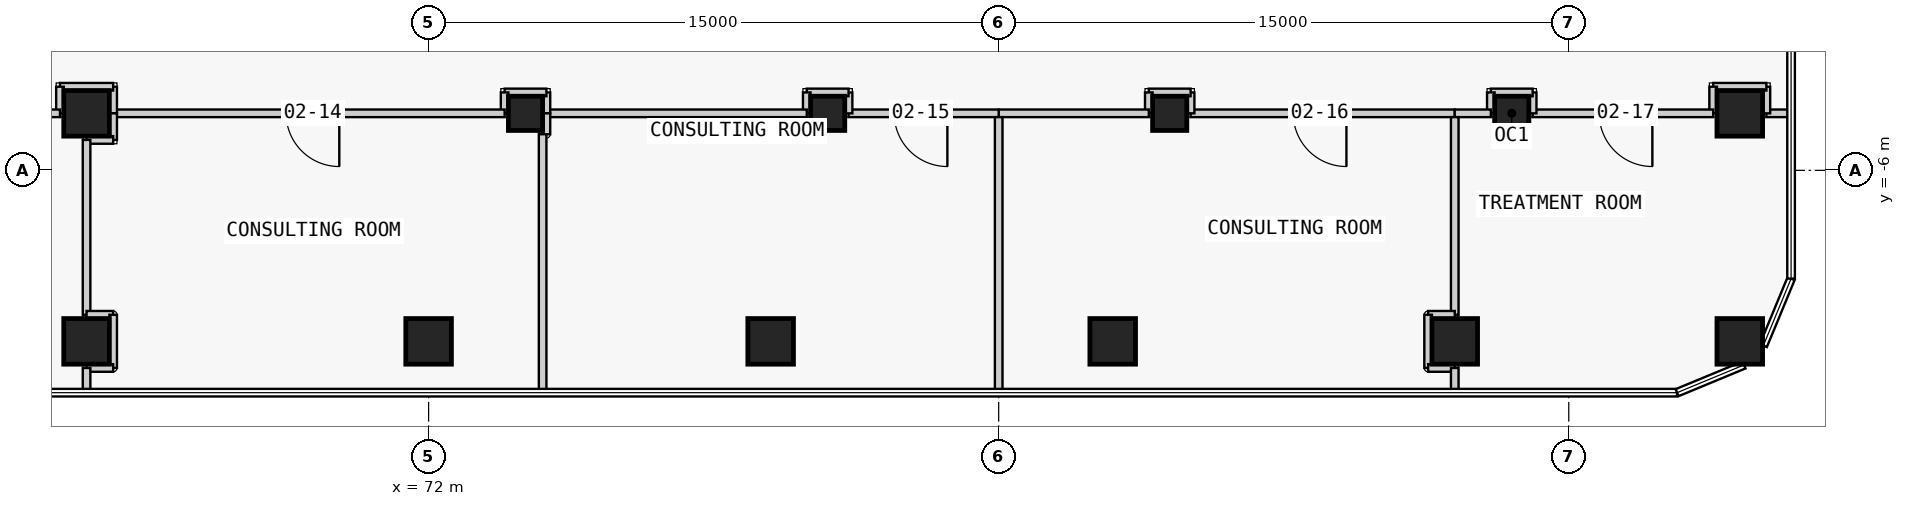
"""IFC4 building model, lengths in metres.
Left out: names, types, materials, properties, quantities, classifications, styles, units other than length and angle.
Written with IfcOpenShell. Run it as: python <this file> out.ifc"""

import sys

from ifc_helpers import new_model, si_unit, direction, frame, frame_2d, origin, origin_2d, place, context, subcontext, project, spatial, rectangle, extrude, element, fill, save


model = new_model("IFC4")
c1 = context("Model", 3, precision=1e-05, world=origin(), true_north=direction((0.0, 1.0)))
c2 = subcontext(c1, "Body", "Model", "MODEL_VIEW")
j1 = project(units=[si_unit("LENGTHUNIT", "METRE"), si_unit("PLANEANGLEUNIT", "RADIAN")], contexts=[c1])
p1 = place(None, origin())
s1 = spatial("IfcSite", under=j1, at=p1, CompositionType="ELEMENT")
p2 = place(p1, origin())
s2 = spatial("IfcBuilding", under=s1, at=p2, CompositionType="ELEMENT")
p3 = place(p2, frame((0.0, 0.0, 12.8)))
s3 = spatial("IfcBuildingStorey", under=s2, at=p3, CompositionType="ELEMENT", Elevation=12.8)
for number, where, z_axis, x_axis in (
    (1, (63.0, -10.5, 0.0), (0.0, 0.0, 1.0), (1.0, 0.0, 0.0)),
    (2, (63.0, -4.5, 0.0), (0.0, 0.0, 1.0), (1.0, 0.0, 0.0)),
    (3, (72.0, -10.5, 0.0), (0.0, 0.0, 1.0), (1.0, 0.0, 0.0)),
    (4, (81.0, -10.5, 0.0), (0.0, 0.0, 1.0), (1.0, 0.0, 0.0)),
    (5, (90.0, -10.5, 0.0), (0.0, 0.0, 1.0), (1.0, 0.0, 0.0)),
    (6, (99.0, -10.5, 0.0), (0.0, 0.0, 1.0), (1.0, 0.0, 0.0)),
    (7, (106.5, -10.5, 0.0), (0.0, 0.0, 1.0), (1.0, 0.0, 0.0)),
    (8, (106.5, -4.5, 0.0), (0.0, 0.0, 1.0), (1.0, 0.0, 0.0)),
):
    element("IfcColumn", number, at=place(p3, frame(where, z_axis=z_axis, x_axis=x_axis)), inside=s3, PredefinedType="COLUMN", context=c2, shape_type="SweptSolid", body=[
        extrude(rectangle(XDim=1.2, YDim=1.2, at=origin_2d()), origin(), (0.0, 0.0, 1.0), 4.5),
    ])
for number, where, z_axis, x_axis in (
    (9, (74.55, -4.5, 0.0), (0.0, 0.0, 1.0), (1.0, 0.0, 0.0)),
    (10, (82.5, -4.5, 0.0), (0.0, 0.0, 1.0), (1.0, 0.0, 0.0)),
    (11, (91.5, -4.5, 0.0), (0.0, 0.0, 1.0), (1.0, 0.0, 0.0)),
    (12, (100.5, -4.5, 0.0), (0.0, 0.0, 1.0), (1.0, 0.0, 0.0)),
):
    element("IfcColumn", number, at=place(p3, frame(where, z_axis=z_axis, x_axis=x_axis)), inside=s3, PredefinedType="COLUMN", context=c2, shape_type="SweptSolid", body=[
        extrude(rectangle(XDim=0.9, YDim=0.9, at=origin_2d()), origin(), (0.0, 0.0, 1.0), 4.5),
    ])
p4 = place(p3, frame((99.0, -4.5, 0.0), z_axis=(0.0, 0.0, 1.0), x_axis=(-1.0, 0.0, 0.0)))
e13 = element("IfcWall", 13, at=p4, inside=s3, PredefinedType="PARTITIONING", context=c2, shape_type="SweptSolid", body=[
    extrude(rectangle(XDim=6.95, YDim=0.2, at=frame_2d((3.475, 0.0))), origin(), (0.0, 0.0, 1.0), 4.15),
])
p5 = place(p4, frame((2.85, 0.0, 0.0)))
e14 = element("IfcOpeningElement", 14, at=p5, cuts=e13, PredefinedType="OPENING", context=c2, shape_type="SweptSolid", body=[
    extrude(rectangle(XDim=1.4, YDim=2.1, at=frame_2d((0.7, 1.05))), frame((0.0, 0.11, 0.0), z_axis=(0.0, -1.0, 0.0), x_axis=(1.0, 0.0, 0.0)), (0.0, 0.0, 1.0), 0.22),
])
p6 = place(p3, frame((92.05, -4.5, 0.0), z_axis=(0.0, 0.0, 1.0), x_axis=(0.0, 1.0, 0.0)))
e15 = element("IfcWall", 15, at=p6, inside=s3, PredefinedType="PARTITIONING", context=c2, shape_type="SweptSolid", body=[
    extrude(rectangle(XDim=0.55, YDim=0.2, at=frame_2d((0.275, 0.0))), origin(), (0.0, 0.0, 1.0), 4.15),
])
p7 = place(p3, frame((92.05, -3.95, 0.0), z_axis=(0.0, 0.0, 1.0), x_axis=(-1.0, 0.0, 0.0)))
e16 = element("IfcWall", 16, at=p7, inside=s3, PredefinedType="PARTITIONING", context=c2, shape_type="SweptSolid", body=[
    extrude(rectangle(XDim=1.1, YDim=0.2, at=frame_2d((0.55, 0.0))), origin(), (0.0, 0.0, 1.0), 4.15),
])
p8 = place(p3, frame((90.95, -3.95, 0.0), z_axis=(0.0, 0.0, 1.0), x_axis=(0.0, -1.0, 0.0)))
e17 = element("IfcWall", 17, at=p8, inside=s3, PredefinedType="PARTITIONING", context=c2, shape_type="SweptSolid", body=[
    extrude(rectangle(XDim=0.55, YDim=0.2, at=frame_2d((0.275, 0.0))), origin(), (0.0, 0.0, 1.0), 4.15),
])
p9 = place(p3, frame((90.95, -4.5, 0.0), z_axis=(0.0, 0.0, 1.0), x_axis=(-1.0, 0.0, 0.0)))
e18 = element("IfcWall", 18, at=p9, inside=s3, PredefinedType="PARTITIONING", context=c2, shape_type="SweptSolid", body=[
    extrude(rectangle(XDim=3.95, YDim=0.2, at=frame_2d((1.975, 0.0))), origin(), (0.0, 0.0, 1.0), 4.15),
])
p10 = place(p3, frame((87.0, -4.5, 0.0), z_axis=(0.0, 0.0, 1.0), x_axis=(-1.0, 0.0, 0.0)))
e19 = element("IfcWall", 19, at=p10, inside=s3, PredefinedType="PARTITIONING", context=c2, shape_type="SweptSolid", body=[
    extrude(rectangle(XDim=3.95, YDim=0.2, at=frame_2d((1.975, 0.0))), origin(), (0.0, 0.0, 1.0), 4.15),
])
p11 = place(p10, frame((1.35, 0.0, 0.0)))
e20 = element("IfcOpeningElement", 20, at=p11, cuts=e19, PredefinedType="OPENING", context=c2, shape_type="SweptSolid", body=[
    extrude(rectangle(XDim=1.4, YDim=2.1, at=frame_2d((0.7, 1.05))), frame((0.0, 0.11, 0.0), z_axis=(0.0, -1.0, 0.0), x_axis=(1.0, 0.0, 0.0)), (0.0, 0.0, 1.0), 0.22),
])
p12 = place(p3, frame((83.05, -4.5, 0.0), z_axis=(0.0, 0.0, 1.0), x_axis=(0.0, 1.0, 0.0)))
e21 = element("IfcWall", 21, at=p12, inside=s3, PredefinedType="PARTITIONING", context=c2, shape_type="SweptSolid", body=[
    extrude(rectangle(XDim=0.55, YDim=0.2, at=frame_2d((0.275, 0.0))), origin(), (0.0, 0.0, 1.0), 4.15),
])
p13 = place(p3, frame((83.05, -3.95, 0.0), z_axis=(0.0, 0.0, 1.0), x_axis=(-1.0, 0.0, 0.0)))
e22 = element("IfcWall", 22, at=p13, inside=s3, PredefinedType="PARTITIONING", context=c2, shape_type="SweptSolid", body=[
    extrude(rectangle(XDim=1.1, YDim=0.2, at=frame_2d((0.55, 0.0))), origin(), (0.0, 0.0, 1.0), 4.15),
])
p14 = place(p3, frame((81.95, -3.95, 0.0), z_axis=(0.0, 0.0, 1.0), x_axis=(0.0, -1.0, 0.0)))
e23 = element("IfcWall", 23, at=p14, inside=s3, PredefinedType="PARTITIONING", context=c2, shape_type="SweptSolid", body=[
    extrude(rectangle(XDim=0.55, YDim=0.2, at=frame_2d((0.275, 0.0))), origin(), (0.0, 0.0, 1.0), 4.15),
])
p15 = place(p3, frame((81.95, -4.5, 0.0), z_axis=(0.0, 0.0, 1.0), x_axis=(-1.0, 0.0, 0.0)))
e24 = element("IfcWall", 24, at=p15, inside=s3, PredefinedType="PARTITIONING", context=c2, shape_type="SweptSolid", body=[
    extrude(rectangle(XDim=6.85, YDim=0.2, at=frame_2d((3.425, 0.0))), origin(), (0.0, 0.0, 1.0), 4.15),
])
p16 = place(p3, frame((75.1, -4.5, 0.0), z_axis=(0.0, 0.0, 1.0), x_axis=(0.0, 1.0, 0.0)))
e25 = element("IfcWall", 25, at=p16, inside=s3, PredefinedType="PARTITIONING", context=c2, shape_type="SweptSolid", body=[
    extrude(rectangle(XDim=0.55, YDim=0.2, at=frame_2d((0.275, 0.0))), origin(), (0.0, 0.0, 1.0), 4.15),
])
p17 = place(p3, frame((75.1, -3.95, 0.0), z_axis=(0.0, 0.0, 1.0), x_axis=(-1.0, 0.0, 0.0)))
e26 = element("IfcWall", 26, at=p17, inside=s3, PredefinedType="PARTITIONING", context=c2, shape_type="SweptSolid", body=[
    extrude(rectangle(XDim=1.1, YDim=0.2, at=frame_2d((0.55, 0.0))), origin(), (0.0, 0.0, 1.0), 4.15),
])
p18 = place(p3, frame((74.0, -3.95, 0.0), z_axis=(0.0, 0.0, 1.0), x_axis=(0.0, -1.0, 0.0)))
e27 = element("IfcWall", 27, at=p18, inside=s3, PredefinedType="PARTITIONING", context=c2, shape_type="SweptSolid", body=[
    extrude(rectangle(XDim=0.55, YDim=0.2, at=frame_2d((0.275, 0.0))), origin(), (0.0, 0.0, 1.0), 4.15),
])
p19 = place(p3, frame((74.0, -4.5, 0.0), z_axis=(0.0, 0.0, 1.0), x_axis=(-1.0, 0.0, 0.0)))
e28 = element("IfcWall", 28, at=p19, inside=s3, PredefinedType="PARTITIONING", context=c2, shape_type="SweptSolid", body=[
    extrude(rectangle(XDim=10.3, YDim=0.2, at=frame_2d((5.15, 0.0))), origin(), (0.0, 0.0, 1.0), 4.15),
])
p20 = place(p19, frame((4.35, 0.0, 0.0)))
e29 = element("IfcOpeningElement", 29, at=p20, cuts=e28, PredefinedType="OPENING", context=c2, shape_type="SweptSolid", body=[
    extrude(rectangle(XDim=1.4, YDim=2.1, at=frame_2d((0.7, 1.05))), frame((0.0, 0.11, 0.0), z_axis=(0.0, -1.0, 0.0), x_axis=(1.0, 0.0, 0.0)), (0.0, 0.0, 1.0), 0.22),
])
p21 = place(p3, frame((107.85, -4.5, 0.0), z_axis=(0.0, 0.0, 1.0), x_axis=(-1.0, 0.0, 0.0)))
e30 = element("IfcWall", 30, at=p21, inside=s3, PredefinedType="PARTITIONING", context=c2, shape_type="SweptSolid", body=[
    extrude(rectangle(XDim=0.65, YDim=0.2, at=frame_2d((0.325, 0.0))), origin(), (0.0, 0.0, 1.0), 4.15),
])
p22 = place(p3, frame((107.2, -4.5, 0.0), z_axis=(0.0, 0.0, 1.0), x_axis=(0.0, 1.0, 0.0)))
e31 = element("IfcWall", 31, at=p22, inside=s3, PredefinedType="PARTITIONING", context=c2, shape_type="SweptSolid", body=[
    extrude(rectangle(XDim=0.7, YDim=0.2, at=frame_2d((0.35, 0.0))), origin(), (0.0, 0.0, 1.0), 4.15),
])
p23 = place(p3, frame((107.2, -3.8, 0.0), z_axis=(0.0, 0.0, 1.0), x_axis=(-1.0, 0.0, 0.0)))
e32 = element("IfcWall", 32, at=p23, inside=s3, PredefinedType="PARTITIONING", context=c2, shape_type="SweptSolid", body=[
    extrude(rectangle(XDim=1.4, YDim=0.2, at=frame_2d((0.7, 0.0))), origin(), (0.0, 0.0, 1.0), 3.45),
])
p24 = place(p3, frame((105.8, -3.8, 0.0), z_axis=(0.0, 0.0, 1.0), x_axis=(0.0, -1.0, 0.0)))
e33 = element("IfcWall", 33, at=p24, inside=s3, PredefinedType="PARTITIONING", context=c2, shape_type="SweptSolid", body=[
    extrude(rectangle(XDim=0.7, YDim=0.2, at=frame_2d((0.35, 0.0))), origin(), (0.0, 0.0, 1.0), 4.15),
])
p25 = place(p3, frame((105.8, -4.5, 0.0), z_axis=(0.0, 0.0, 1.0), x_axis=(-1.0, 0.0, 0.0)))
e34 = element("IfcWall", 34, at=p25, inside=s3, PredefinedType="PARTITIONING", context=c2, shape_type="SweptSolid", body=[
    extrude(rectangle(XDim=4.75, YDim=0.2, at=frame_2d((2.375, 0.0))), origin(), (0.0, 0.0, 1.0), 4.15),
])
p26 = place(p25, frame((1.6, 0.0, 0.0)))
e35 = element("IfcOpeningElement", 35, at=p26, cuts=e34, PredefinedType="OPENING", context=c2, shape_type="SweptSolid", body=[
    extrude(rectangle(XDim=1.4, YDim=2.1, at=frame_2d((0.7, 1.05))), frame((0.0, 0.11, 0.0), z_axis=(0.0, -1.0, 0.0), x_axis=(1.0, 0.0, 0.0)), (0.0, 0.0, 1.0), 0.22),
])
p27 = place(p3, frame((101.05, -4.5, 0.0), z_axis=(0.0, 0.0, 1.0), x_axis=(0.0, 1.0, 0.0)))
e36 = element("IfcWall", 36, at=p27, inside=s3, PredefinedType="PARTITIONING", context=c2, shape_type="SweptSolid", body=[
    extrude(rectangle(XDim=0.55, YDim=0.2, at=frame_2d((0.275, 0.0))), origin(), (0.0, 0.0, 1.0), 4.15),
])
p28 = place(p3, frame((101.05, -3.95, 0.0), z_axis=(0.0, 0.0, 1.0), x_axis=(-1.0, 0.0, 0.0)))
e37 = element("IfcWall", 37, at=p28, inside=s3, PredefinedType="PARTITIONING", context=c2, shape_type="SweptSolid", body=[
    extrude(rectangle(XDim=1.1, YDim=0.2, at=frame_2d((0.55, 0.0))), origin(), (0.0, 0.0, 1.0), 4.15),
])
p29 = place(p3, frame((99.95, -3.95, 0.0), z_axis=(0.0, 0.0, 1.0), x_axis=(0.0, -1.0, 0.0)))
e38 = element("IfcWall", 38, at=p29, inside=s3, PredefinedType="PARTITIONING", context=c2, shape_type="SweptSolid", body=[
    extrude(rectangle(XDim=0.55, YDim=0.2, at=frame_2d((0.275, 0.0))), origin(), (0.0, 0.0, 1.0), 4.15),
])
p30 = place(p3, frame((99.95, -4.5, 0.0), z_axis=(0.0, 0.0, 1.0), x_axis=(-1.0, 0.0, 0.0)))
e39 = element("IfcWall", 39, at=p30, inside=s3, PredefinedType="PARTITIONING", context=c2, shape_type="SweptSolid", body=[
    extrude(rectangle(XDim=0.95, YDim=0.2, at=frame_2d((0.475, 0.0))), origin(), (0.0, 0.0, 1.0), 4.15),
])
p31 = place(p3, frame((63.7, -4.5, 0.0), z_axis=(0.0, 0.0, 1.0), x_axis=(0.0, 1.0, 0.0)))
e40 = element("IfcWall", 40, at=p31, inside=s3, PredefinedType="PARTITIONING", context=c2, shape_type="SweptSolid", body=[
    extrude(rectangle(XDim=0.7, YDim=0.2, at=frame_2d((0.35, 0.0))), origin(), (0.0, 0.0, 1.0), 4.15),
])
p32 = place(p3, frame((63.7, -3.8, 0.0), z_axis=(0.0, 0.0, 1.0), x_axis=(-1.0, 0.0, 0.0)))
e41 = element("IfcWall", 41, at=p32, inside=s3, PredefinedType="PARTITIONING", context=c2, shape_type="SweptSolid", body=[
    extrude(rectangle(XDim=1.4, YDim=0.2, at=frame_2d((0.7, 0.0))), origin(), (0.0, 0.0, 1.0), 3.45),
])
p33 = place(p3, frame((62.3, -3.8, 0.0), z_axis=(0.0, 0.0, 1.0), x_axis=(0.0, -1.0, 0.0)))
e42 = element("IfcWall", 42, at=p33, inside=s3, PredefinedType="PARTITIONING", context=c2, shape_type="SweptSolid", body=[
    extrude(rectangle(XDim=0.7, YDim=0.2, at=frame_2d((0.35, 0.0))), origin(), (0.0, 0.0, 1.0), 3.45),
])
p34 = place(p3, frame((62.3, -4.5, 0.0), z_axis=(0.0, 0.0, 1.0), x_axis=(-1.0, 0.0, 0.0)))
e43 = element("IfcWall", 43, at=p34, inside=s3, PredefinedType="PARTITIONING", context=c2, shape_type="SweptSolid", body=[
    extrude(rectangle(XDim=7.6, YDim=0.2, at=frame_2d((3.8, 0.0))), origin(), (0.0, 0.0, 1.0), 3.45),
])
p35 = place(p34, frame((3.1, 0.0, 0.0)))
e44 = element("IfcOpeningElement", 44, at=p35, cuts=e43, PredefinedType="OPENING", context=c2, shape_type="SweptSolid", body=[
    extrude(rectangle(XDim=1.4, YDim=2.1, at=frame_2d((0.7, 1.05))), frame((0.0, 0.11, 0.0), z_axis=(0.0, -1.0, 0.0), x_axis=(1.0, 0.0, 0.0)), (0.0, 0.0, 1.0), 0.22),
])
p36 = place(p3, frame((63.7, -4.5, 0.0), z_axis=(0.0, 0.0, 1.0), x_axis=(0.0, -1.0, 0.0)))
e45 = element("IfcWall", 45, at=p36, inside=s3, PredefinedType="PARTITIONING", context=c2, shape_type="SweptSolid", body=[
    extrude(rectangle(XDim=0.7, YDim=0.2, at=frame_2d((0.35, 0.0))), origin(), (0.0, 0.0, 1.0), 4.15),
])
p37 = place(p3, frame((63.7, -5.2, 0.0), z_axis=(0.0, 0.0, 1.0), x_axis=(-1.0, 0.0, 0.0)))
e46 = element("IfcWall", 46, at=p37, inside=s3, PredefinedType="PARTITIONING", context=c2, shape_type="SweptSolid", body=[
    extrude(rectangle(XDim=0.7, YDim=0.2, at=frame_2d((0.35, 0.0))), origin(), (0.0, 0.0, 1.0), 3.45),
])
p38 = place(p3, frame((63.0, -5.2, 0.0), z_axis=(0.0, 0.0, 1.0), x_axis=(0.0, -1.0, 0.0)))
e47 = element("IfcWall", 47, at=p38, inside=s3, PredefinedType="PARTITIONING", context=c2, shape_type="SweptSolid", body=[
    extrude(rectangle(XDim=4.6, YDim=0.2, at=frame_2d((2.3, 0.0))), origin(), (0.0, 0.0, 1.0), 3.45),
])
p39 = place(p3, frame((63.0, -9.8, 0.0), z_axis=(0.0, 0.0, 1.0), x_axis=(1.0, 0.0, 0.0)))
e48 = element("IfcWall", 48, at=p39, inside=s3, PredefinedType="PARTITIONING", context=c2, shape_type="SweptSolid", body=[
    extrude(rectangle(XDim=0.7, YDim=0.2, at=frame_2d((0.35, 0.0))), origin(), (0.0, 0.0, 1.0), 3.45),
])
p40 = place(p3, frame((63.7, -9.8, 0.0), z_axis=(0.0, 0.0, 1.0), x_axis=(0.0, -1.0, 0.0)))
e49 = element("IfcWall", 49, at=p40, inside=s3, PredefinedType="PARTITIONING", context=c2, shape_type="SweptSolid", body=[
    extrude(rectangle(XDim=1.4, YDim=0.2, at=frame_2d((0.7, 0.0))), origin(), (0.0, 0.0, 1.0), 3.45),
])
p41 = place(p3, frame((63.7, -11.2, 0.0), z_axis=(0.0, 0.0, 1.0), x_axis=(-1.0, 0.0, 0.0)))
e50 = element("IfcWall", 50, at=p41, inside=s3, PredefinedType="PARTITIONING", context=c2, shape_type="SweptSolid", body=[
    extrude(rectangle(XDim=0.7, YDim=0.2, at=frame_2d((0.35, 0.0))), origin(), (0.0, 0.0, 1.0), 4.15),
])
p42 = place(p3, frame((63.0, -11.2, 0.0), z_axis=(0.0, 0.0, 1.0), x_axis=(0.0, -1.0, 0.0)))
e51 = element("IfcWall", 51, at=p42, inside=s3, PredefinedType="PARTITIONING", context=c2, shape_type="SweptSolid", body=[
    extrude(rectangle(XDim=0.65, YDim=0.2, at=frame_2d((0.325, 0.0))), origin(), (0.0, 0.0, 1.0), 4.15),
])
p43 = place(p3, frame((99.0, -4.6, 0.0), z_axis=(0.0, 0.0, 1.0), x_axis=(0.0, -1.0, 0.0)))
e52 = element("IfcWall", 52, at=p43, inside=s3, PredefinedType="PARTITIONING", context=c2, shape_type="SweptSolid", body=[
    extrude(rectangle(XDim=5.2, YDim=0.2, at=frame_2d((2.6, 0.0))), origin(), (0.0, 0.0, 1.0), 4.15),
])
p44 = place(p3, frame((99.0, -9.8, 0.0), z_axis=(0.0, 0.0, 1.0), x_axis=(-1.0, 0.0, 0.0)))
e53 = element("IfcWall", 53, at=p44, inside=s3, PredefinedType="PARTITIONING", context=c2, shape_type="SweptSolid", body=[
    extrude(rectangle(XDim=0.7, YDim=0.2, at=frame_2d((0.35, 0.0))), origin(), (0.0, 0.0, 1.0), 4.15),
])
p45 = place(p3, frame((98.3, -9.8, 0.0), z_axis=(0.0, 0.0, 1.0), x_axis=(0.0, -1.0, 0.0)))
e54 = element("IfcWall", 54, at=p45, inside=s3, PredefinedType="PARTITIONING", context=c2, shape_type="SweptSolid", body=[
    extrude(rectangle(XDim=1.4, YDim=0.2, at=frame_2d((0.7, 0.0))), origin(), (0.0, 0.0, 1.0), 3.45),
])
p46 = place(p3, frame((98.3, -11.2, 0.0), z_axis=(0.0, 0.0, 1.0), x_axis=(1.0, 0.0, 0.0)))
e55 = element("IfcWall", 55, at=p46, inside=s3, PredefinedType="PARTITIONING", context=c2, shape_type="SweptSolid", body=[
    extrude(rectangle(XDim=0.7, YDim=0.2, at=frame_2d((0.35, 0.0))), origin(), (0.0, 0.0, 1.0), 4.15),
])
p47 = place(p3, frame((99.0, -11.2, 0.0), z_axis=(0.0, 0.0, 1.0), x_axis=(0.0, -1.0, 0.0)))
e56 = element("IfcWall", 56, at=p47, inside=s3, PredefinedType="PARTITIONING", context=c2, shape_type="SweptSolid", body=[
    extrude(rectangle(XDim=0.65, YDim=0.2, at=frame_2d((0.325, 0.0))), origin(), (0.0, 0.0, 1.0), 4.15),
])
p48 = place(p3, frame((75.1, -4.5, 0.0), z_axis=(0.0, 0.0, 1.0), x_axis=(0.0, -1.0, 0.0)))
e57 = element("IfcWall", 57, at=p48, inside=s3, PredefinedType="PARTITIONING", context=c2, shape_type="SweptSolid", body=[
    extrude(rectangle(XDim=0.55, YDim=0.2, at=frame_2d((0.275, 0.0))), origin(), (0.0, 0.0, 1.0), 4.15),
])
p49 = place(p3, frame((75.0, -5.05, 0.0), z_axis=(0.0, 0.0, 1.0), x_axis=(0.0, -1.0, 0.0)))
e58 = element("IfcWall", 58, at=p49, inside=s3, PredefinedType="PARTITIONING", context=c2, shape_type="SweptSolid", body=[
    extrude(rectangle(XDim=6.8, YDim=0.2, at=frame_2d((3.4, 0.0))), origin(), (0.0, 0.0, 1.0), 3.45),
])
p50 = place(p3, frame((87.0, -4.6, 0.0), z_axis=(0.0, 0.0, 1.0), x_axis=(0.0, -1.0, 0.0)))
e59 = element("IfcWall", 59, at=p50, inside=s3, PredefinedType="PARTITIONING", context=c2, shape_type="SweptSolid", body=[
    extrude(rectangle(XDim=7.25, YDim=0.2, at=frame_2d((3.625, 0.0))), origin(), (0.0, 0.0, 1.0), 3.45),
])
p51 = place(p20, origin())
e60 = element("IfcDoor", 60, at=p51, inside=s3, OperationType="SINGLE_SWING_LEFT", PredefinedType="DOOR", context=c2, shape_type="SweptSolid", body=[
    extrude(rectangle(XDim=1.4, YDim=2.1, at=frame_2d((0.7, 1.05))), frame((0.0, 0.025, 0.0), z_axis=(0.0, -1.0, 0.0), x_axis=(1.0, 0.0, 0.0)), (0.0, 0.0, 1.0), 0.05),
])
fill(e29, e60)
p52 = place(p11, origin())
e61 = element("IfcDoor", 61, at=p52, inside=s3, OperationType="SINGLE_SWING_LEFT", PredefinedType="DOOR", context=c2, shape_type="SweptSolid", body=[
    extrude(rectangle(XDim=1.4, YDim=2.1, at=frame_2d((0.7, 1.05))), frame((0.0, 0.025, 0.0), z_axis=(0.0, -1.0, 0.0), x_axis=(1.0, 0.0, 0.0)), (0.0, 0.0, 1.0), 0.05),
])
fill(e20, e61)
p53 = place(p5, origin())
e62 = element("IfcDoor", 62, at=p53, inside=s3, OperationType="SINGLE_SWING_LEFT", PredefinedType="DOOR", context=c2, shape_type="SweptSolid", body=[
    extrude(rectangle(XDim=1.4, YDim=2.1, at=frame_2d((0.7, 1.05))), frame((0.0, 0.025, 0.0), z_axis=(0.0, -1.0, 0.0), x_axis=(1.0, 0.0, 0.0)), (0.0, 0.0, 1.0), 0.05),
])
fill(e14, e62)
p54 = place(p26, origin())
e63 = element("IfcDoor", 63, at=p54, inside=s3, OperationType="SINGLE_SWING_LEFT", PredefinedType="DOOR", context=c2, shape_type="SweptSolid", body=[
    extrude(rectangle(XDim=1.4, YDim=2.1, at=frame_2d((0.7, 1.05))), frame((0.0, 0.025, 0.0), z_axis=(0.0, -1.0, 0.0), x_axis=(1.0, 0.0, 0.0)), (0.0, 0.0, 1.0), 0.05),
])
fill(e35, e63)
save(model, sys.argv[1])
